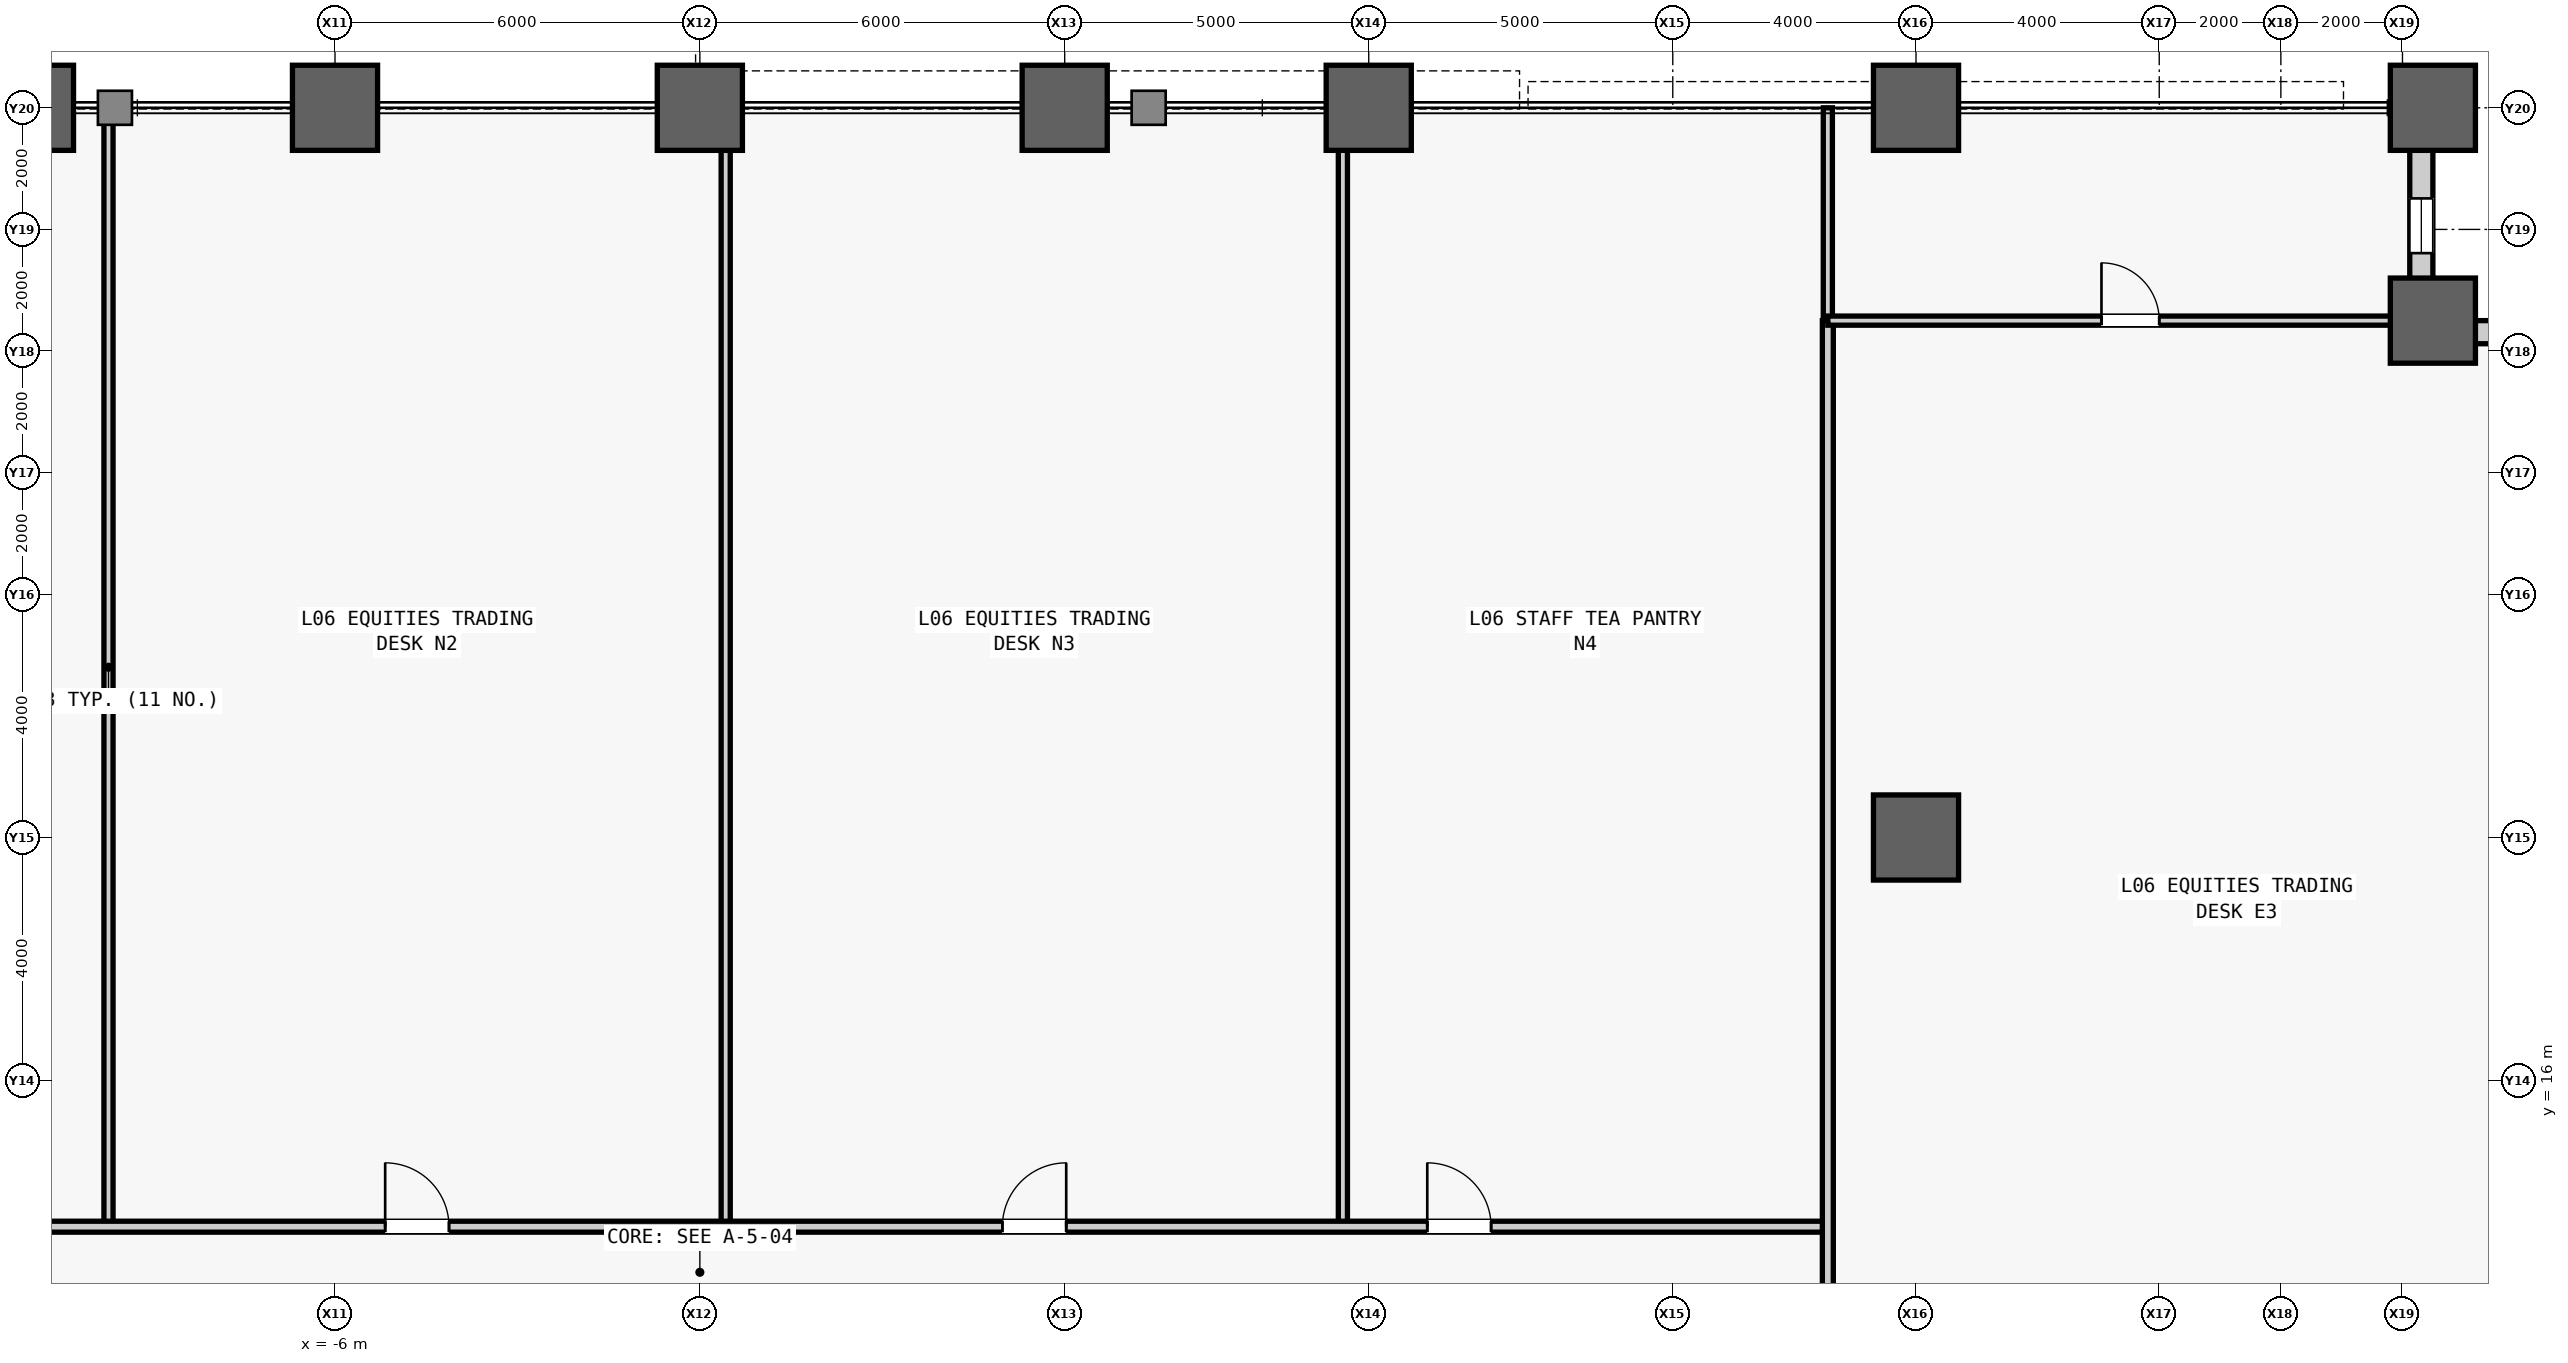
"""IFC4 building model, lengths in metres.
Left out: names, types, materials, properties, quantities, classifications, styles, units other than length and angle.
Written with IfcOpenShell. Run it as: python <this file> out.ifc"""

import sys

from ifc_helpers import new_model, si_unit, direction, frame, frame_2d, origin, origin_2d, place, context, subcontext, project, spatial, rectangle, hollow_rectangle, extrude, source, transform, mapped, element, fill, save


model = new_model("IFC4")
c1 = context("Model", 3, precision=1e-05, world=origin(), true_north=direction((0.0, 1.0)))
c2 = subcontext(c1, "Body", "Model", "MODEL_VIEW")
j1 = project(units=[si_unit("LENGTHUNIT", "METRE"), si_unit("PLANEANGLEUNIT", "RADIAN")], contexts=[c1])
p1 = place(None, origin())
s1 = spatial("IfcSite", under=j1, at=p1, CompositionType="ELEMENT")
p2 = place(p1, origin())
s2 = spatial("IfcBuilding", under=s1, at=p2, CompositionType="ELEMENT")
p3 = place(p2, frame((0.0, 0.0, 32.6)))
s3 = spatial("IfcBuildingStorey", under=s2, at=p3, CompositionType="ELEMENT", Elevation=32.6)
m1 = source(origin(), c2, "Body", "SweptSolid", [
    extrude(hollow_rectangle(XDim=1.4, YDim=1.4, WallThickness=0.075, at=origin_2d()), origin(), (0.0, 0.0, 1.0), 4.2),
])
for number, where, z_axis, x_axis in (
    (1, (-11.0, 32.0, 0.0), (0.0, 0.0, 1.0), (1.0, 0.0, 0.0)),
    (2, (-6.0, 32.0, 0.0), (0.0, 0.0, 1.0), (1.0, 0.0, 0.0)),
    (3, (0.0, 32.0, 0.0), (0.0, 0.0, 1.0), (1.0, 0.0, 0.0)),
    (4, (6.0, 32.0, 0.0), (0.0, 0.0, 1.0), (1.0, 0.0, 0.0)),
    (5, (11.0, 32.0, 0.0), (0.0, 0.0, 1.0), (1.0, 0.0, 0.0)),
    (6, (20.0, 20.0, 0.0), (0.0, 0.0, 1.0), (1.0, 0.0, 0.0)),
    (7, (20.0, 32.0, 0.0), (0.0, 0.0, 1.0), (1.0, 0.0, 0.0)),
    (8, (28.5, 28.5, 0.0), (0.0, 0.0, 1.0), (1.0, 0.0, 0.0)),
    (9, (28.5, 32.0, 0.0), (0.0, 0.0, 1.0), (1.0, 0.0, 0.0)),
):
    element("IfcColumn", number, at=place(p3, frame(where, z_axis=z_axis, x_axis=x_axis)), inside=s3, PredefinedType="COLUMN", context=c2, shape_type="MappedRepresentation", body=[
        mapped(m1, transform((0.0, 0.0, 0.0), scale=1.0)),
    ])
m2 = source(origin(), c2, "Body", "SweptSolid", [
    extrude(rectangle(XDim=3.12, YDim=0.38, at=frame_2d((1.56, 0.0))), origin(), (0.0, 0.0, 1.0), 3.245),
])
p4 = place(p3, frame((28.5, 28.31, 0.0), z_axis=(0.0, 0.0, 1.0), x_axis=(1.0, 0.0, 0.0)))
e10 = element("IfcWall", 10, at=p4, inside=s3, PredefinedType="STANDARD", context=c2, shape_type="MappedRepresentation", body=[
    mapped(m2, transform((0.0, 0.0, 0.0), scale=1.0)),
])
m3 = source(origin(), c2, "Body", "SweptSolid", [
    extrude(rectangle(XDim=0.9, YDim=2.4, at=frame_2d((0.45, 1.2))), frame((0.0, 0.2, 0.0), z_axis=(0.0, -1.0, 0.0), x_axis=(1.0, 0.0, 0.0)), (0.0, 0.0, 1.0), 0.4),
])
p5 = place(p4, frame((1.11, 0.0, 0.5)))
e11 = element("IfcOpeningElement", 11, at=p5, cuts=e10, PredefinedType="OPENING", context=c2, shape_type="MappedRepresentation", body=[
    mapped(m3, transform((0.0, 0.0, 0.0), scale=1.0)),
])
p6 = place(p3, frame((28.31, 28.5, 0.0), z_axis=(0.0, 0.0, 1.0), x_axis=(0.0, 1.0, 0.0)))
e12 = element("IfcWall", 12, at=p6, inside=s3, PredefinedType="STANDARD", context=c2, shape_type="MappedRepresentation", body=[
    mapped(m2, transform((0.0, 0.0, 0.0), scale=1.0)),
])
p7 = place(p6, frame((1.11, 0.0, 0.5)))
e13 = element("IfcOpeningElement", 13, at=p7, cuts=e12, PredefinedType="OPENING", context=c2, shape_type="MappedRepresentation", body=[
    mapped(m3, transform((0.0, 0.0, 0.0), scale=1.0)),
])
m4 = source(origin(), c2, "Body", "SweptSolid", [
    extrude(rectangle(XDim=18.4, YDim=0.15, at=frame_2d((9.2, 0.0))), origin(), (0.0, 0.0, 1.0), 3.94),
])
for number, where, z_axis, x_axis in (
    (14, (-9.725, 13.6, 0.0), (0.0, 0.0, 1.0), (0.0, 1.0, 0.0)),
    (15, (0.425, 13.6, 0.0), (0.0, 0.0, 1.0), (0.0, 1.0, 0.0)),
    (16, (10.575, 13.6, 0.0), (0.0, 0.0, 1.0), (0.0, 1.0, 0.0)),
):
    element("IfcWall", number, at=place(p3, frame(where, z_axis=z_axis, x_axis=x_axis)), inside=s3, PredefinedType="PARTITIONING", context=c2, shape_type="MappedRepresentation", body=[
        mapped(m4, transform((0.0, 0.0, 0.0), scale=1.0)),
    ])
m5 = source(origin(), c2, "Body", "SweptSolid", [
    extrude(rectangle(XDim=36.25, YDim=0.18, at=frame_2d((18.125, 0.0))), origin(), (0.0, 0.0, 1.0), 3.94),
])
p8 = place(p3, frame((-17.7, 13.6, 0.0), z_axis=(0.0, 0.0, 1.0), x_axis=(1.0, 0.0, 0.0)))
e17 = element("IfcWall", 17, at=p8, inside=s3, PredefinedType="PARTITIONING", context=c2, shape_type="MappedRepresentation", body=[
    mapped(m5, transform((0.0, 0.0, 0.0), scale=1.0)),
])
m6 = source(origin(), c2, "Body", "SweptSolid", [
    extrude(rectangle(XDim=1.05, YDim=2.2, at=frame_2d((0.525, 1.1))), frame((0.0, 0.1, 0.0), z_axis=(0.0, -1.0, 0.0), x_axis=(1.0, 0.0, 0.0)), (0.0, 0.0, 1.0), 0.2),
])
p9 = place(p8, frame((5.113, 0.0, 0.0)))
e18 = element("IfcOpeningElement", 18, at=p9, cuts=e17, PredefinedType="OPENING", context=c2, shape_type="MappedRepresentation", body=[
    mapped(m6, transform((0.0, 0.0, 0.0), scale=1.0)),
])
p10 = place(p8, frame((12.525, 0.0, 0.0)))
e19 = element("IfcOpeningElement", 19, at=p10, cuts=e17, PredefinedType="OPENING", context=c2, shape_type="MappedRepresentation", body=[
    mapped(m6, transform((0.0, 0.0, 0.0), scale=1.0)),
])
p11 = place(p8, frame((22.675, 0.0, 0.0)))
e20 = element("IfcOpeningElement", 20, at=p11, cuts=e17, PredefinedType="OPENING", context=c2, shape_type="MappedRepresentation", body=[
    mapped(m6, transform((0.0, 0.0, 0.0), scale=1.0)),
])
p12 = place(p8, frame((29.663, 0.0, 0.0)))
e21 = element("IfcOpeningElement", 21, at=p12, cuts=e17, PredefinedType="OPENING", context=c2, shape_type="MappedRepresentation", body=[
    mapped(m6, transform((0.0, 0.0, 0.0), scale=1.0)),
])
m7 = source(origin(), c2, "Body", "SweptSolid", [
    extrude(rectangle(XDim=3.5, YDim=0.15, at=frame_2d((1.75, 0.0))), origin(), (0.0, 0.0, 1.0), 3.94),
])
p13 = place(p3, frame((18.55, 28.5, 0.0), z_axis=(0.0, 0.0, 1.0), x_axis=(0.0, 1.0, 0.0)))
e22 = element("IfcWall", 22, at=p13, inside=s3, PredefinedType="PARTITIONING", context=c2, shape_type="MappedRepresentation", body=[
    mapped(m7, transform((0.0, 0.0, 0.0), scale=1.0)),
])
m8 = source(origin(), c2, "Body", "SweptSolid", [
    extrude(rectangle(XDim=57.0, YDim=0.18, at=frame_2d((28.5, 0.0))), origin(), (0.0, 0.0, 1.0), 3.94),
])
p14 = place(p3, frame((18.55, -28.5, 0.0), z_axis=(0.0, 0.0, 1.0), x_axis=(0.0, 1.0, 0.0)))
e23 = element("IfcWall", 23, at=p14, inside=s3, PredefinedType="PARTITIONING", context=c2, shape_type="MappedRepresentation", body=[
    mapped(m8, transform((0.0, 0.0, 0.0), scale=1.0)),
])
m9 = source(origin(), c2, "Body", "SweptSolid", [
    extrude(rectangle(XDim=0.95, YDim=2.15, at=frame_2d((0.475, 1.075))), frame((0.0, 0.1, 0.0), z_axis=(0.0, -1.0, 0.0), x_axis=(1.0, 0.0, 0.0)), (0.0, 0.0, 1.0), 0.2),
])
p15 = place(p14, frame((19.485, 0.0, 0.0)))
e24 = element("IfcOpeningElement", 24, at=p15, cuts=e23, PredefinedType="OPENING", context=c2, shape_type="MappedRepresentation", body=[
    mapped(m9, transform((0.0, 0.0, 0.0), scale=1.0)),
])
p16 = place(p14, frame((28.705, 0.0, 0.0)))
e25 = element("IfcOpeningElement", 25, at=p16, cuts=e23, PredefinedType="OPENING", context=c2, shape_type="MappedRepresentation", body=[
    mapped(m9, transform((0.0, 0.0, 0.0), scale=1.0)),
])
p17 = place(p14, frame((37.245, 0.0, 0.0)))
e26 = element("IfcOpeningElement", 26, at=p17, cuts=e23, PredefinedType="OPENING", context=c2, shape_type="MappedRepresentation", body=[
    mapped(m9, transform((0.0, 0.0, 0.0), scale=1.0)),
])
m10 = source(origin(), c2, "Body", "SweptSolid", [
    extrude(rectangle(XDim=9.95, YDim=0.15, at=frame_2d((4.975, 0.0))), origin(), (0.0, 0.0, 1.0), 3.94),
])
p18 = place(p3, frame((18.55, 28.5, 0.0), z_axis=(0.0, 0.0, 1.0), x_axis=(1.0, 0.0, 0.0)))
e27 = element("IfcWall", 27, at=p18, inside=s3, PredefinedType="PARTITIONING", context=c2, shape_type="MappedRepresentation", body=[
    mapped(m10, transform((0.0, 0.0, 0.0), scale=1.0)),
])
m11 = source(origin(), c2, "Body", "SweptSolid", [
    extrude(rectangle(XDim=0.95, YDim=2.15, at=frame_2d((0.475, 1.075))), frame((0.0, 0.085, 0.0), z_axis=(0.0, -1.0, 0.0), x_axis=(1.0, 0.0, 0.0)), (0.0, 0.0, 1.0), 0.17),
])
p19 = place(p18, frame((4.5, 0.0, 0.0)))
e28 = element("IfcOpeningElement", 28, at=p19, cuts=e27, PredefinedType="OPENING", context=c2, shape_type="MappedRepresentation", body=[
    mapped(m11, transform((0.0, 0.0, 0.0), scale=1.0)),
])
m12 = source(origin(), c2, "Body", "SweptSolid", [
    extrude(rectangle(XDim=0.9, YDim=2.4, at=frame_2d((0.45, 1.2))), frame((0.0, 0.03, 0.0), z_axis=(0.0, -1.0, 0.0), x_axis=(1.0, 0.0, 0.0)), (0.0, 0.0, 1.0), 0.06),
])
p20 = place(p7, origin())
e29 = element("IfcWindow", 29, at=p20, inside=s3, PartitioningType="SINGLE_PANEL", PredefinedType="WINDOW", context=c2, shape_type="MappedRepresentation", body=[
    mapped(m12, transform((0.0, 0.0, 0.0), scale=1.0)),
])
fill(e13, e29)
m13 = source(origin(), c2, "Body", "SweptSolid", [
    extrude(rectangle(XDim=1.05, YDim=2.2, at=frame_2d((0.525, 1.1))), frame((0.0, 0.025, 0.0), z_axis=(0.0, -1.0, 0.0), x_axis=(1.0, 0.0, 0.0)), (0.0, 0.0, 1.0), 0.05),
])
p21 = place(p10, origin())
e30 = element("IfcDoor", 30, at=p21, inside=s3, OperationType="SINGLE_SWING_LEFT", PredefinedType="DOOR", context=c2, shape_type="MappedRepresentation", body=[
    mapped(m13, transform((0.0, 0.0, 0.0), scale=1.0)),
])
fill(e19, e30)
p22 = place(p11, origin())
e31 = element("IfcDoor", 31, at=p22, inside=s3, OperationType="SINGLE_SWING_RIGHT", PredefinedType="DOOR", context=c2, shape_type="MappedRepresentation", body=[
    mapped(m13, transform((0.0, 0.0, 0.0), scale=1.0)),
])
fill(e20, e31)
p23 = place(p12, origin())
e32 = element("IfcDoor", 32, at=p23, inside=s3, OperationType="SINGLE_SWING_LEFT", PredefinedType="DOOR", context=c2, shape_type="MappedRepresentation", body=[
    mapped(m13, transform((0.0, 0.0, 0.0), scale=1.0)),
])
fill(e21, e32)
m14 = source(origin(), c2, "Body", "SweptSolid", [
    extrude(rectangle(XDim=0.95, YDim=2.15, at=frame_2d((0.475, 1.075))), frame((0.0, 0.025, 0.0), z_axis=(0.0, -1.0, 0.0), x_axis=(1.0, 0.0, 0.0)), (0.0, 0.0, 1.0), 0.05),
])
p24 = place(p19, origin())
e33 = element("IfcDoor", 33, at=p24, inside=s3, OperationType="SINGLE_SWING_LEFT", PredefinedType="DOOR", context=c2, shape_type="MappedRepresentation", body=[
    mapped(m14, transform((0.0, 0.0, 0.0), scale=1.0)),
])
fill(e28, e33)
save(model, sys.argv[1])
